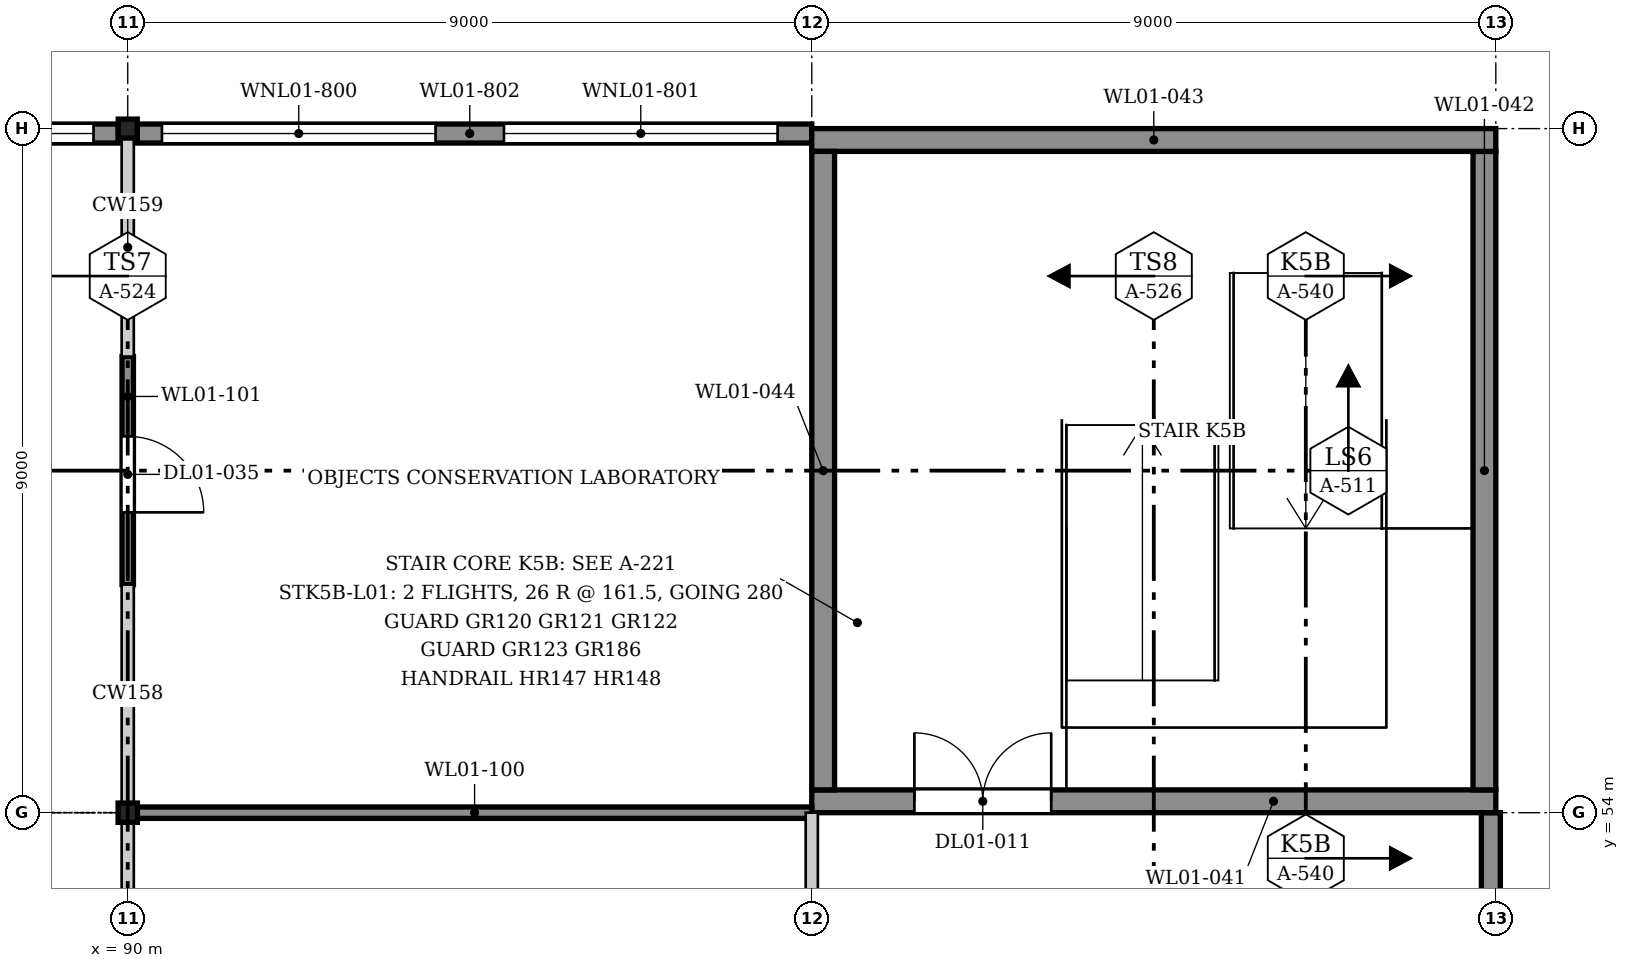
"""IFC4 building model, lengths in metres.
Left out: names, types, materials, properties, quantities, classifications, styles, units other than length and angle.
Written with IfcOpenShell. Run it as: python <this file> out.ifc"""

import sys

from ifc_helpers import new_model, si_unit, direction, frame, frame_2d, origin, origin_2d, place, context, subcontext, project, spatial, rectangle, hollow_rectangle, i_section, extrude, element, fill, save


model = new_model("IFC4")
c1 = context("Model", 3, precision=1e-05, world=origin(), true_north=direction((0.0, 1.0)))
c2 = subcontext(c1, "Body", "Model", "MODEL_VIEW")
j1 = project(units=[si_unit("LENGTHUNIT", "METRE"), si_unit("PLANEANGLEUNIT", "RADIAN")], contexts=[c1])
p1 = place(None, origin())
s1 = spatial("IfcSite", under=j1, at=p1, CompositionType="ELEMENT")
p2 = place(p1, origin())
s2 = spatial("IfcBuilding", under=s1, at=p2, CompositionType="ELEMENT")
p3 = place(p2, frame((0.0, 0.0, 5.0)))
s3 = spatial("IfcBuildingStorey", under=s2, at=p3, CompositionType="ELEMENT", Elevation=5.0)
p4 = place(p3, frame((90.0, 54.0, 0.0), z_axis=(0.0, 0.0, 1.0), x_axis=(1.0, 0.0, 0.0)))
e1 = element("IfcColumn", 1, at=p4, inside=s3, PredefinedType="COLUMN", context=c2, shape_type="SweptSolid", body=[
    extrude(i_section(OverallWidth=0.254, OverallDepth=0.254, WebThickness=0.009, FlangeThickness=0.014, FilletRadius=0.014, at=origin_2d()), origin(), (0.0, 0.0, 1.0), 3.9),
])
p5 = place(p3, frame((90.0, 63.0, 0.0), z_axis=(0.0, 0.0, 1.0), x_axis=(1.0, 0.0, 0.0)))
e2 = element("IfcColumn", 2, at=p5, inside=s3, PredefinedType="COLUMN", context=c2, shape_type="SweptSolid", body=[
    extrude(hollow_rectangle(XDim=0.25, YDim=0.25, WallThickness=0.01, InnerFilletRadius=0.015, OuterFilletRadius=0.025, at=origin_2d()), origin(), (0.0, 0.0, 1.0), 3.9),
])
p6 = place(p3, frame((107.935, 45.15, 0.0), z_axis=(0.0, 0.0, 1.0), x_axis=(0.0, 1.0, 0.0)))
e3 = element("IfcWall", 3, at=p6, inside=s3, PredefinedType="SOLIDWALL", context=c2, shape_type="SweptSolid", body=[
    extrude(rectangle(XDim=8.85, YDim=0.25, at=frame_2d((4.425, 0.0))), origin(), (0.0, 0.0, 1.0), 3.25),
])
p7 = place(p3, frame((90.125, 62.935, 0.0), z_axis=(0.0, 0.0, 1.0), x_axis=(1.0, 0.0, 0.0)))
e4 = element("IfcWall", 4, at=p7, inside=s3, PredefinedType="SOLIDWALL", context=c2, shape_type="SweptSolid", body=[
    extrude(rectangle(XDim=8.875, YDim=0.25, at=frame_2d((4.438, 0.0))), origin(), (0.0, 0.0, 1.0), 2.95),
])
p8 = place(p7, frame((0.325, 0.0, 1.1)))
e5 = element("IfcOpeningElement", 5, at=p8, cuts=e4, PredefinedType="OPENING", context=c2, shape_type="SweptSolid", body=[
    extrude(rectangle(XDim=3.6, YDim=1.2, at=frame_2d((1.8, 0.6))), frame((0.0, 0.135, 0.0), z_axis=(0.0, -1.0, 0.0), x_axis=(1.0, 0.0, 0.0)), (0.0, 0.0, 1.0), 0.27),
])
p9 = place(p7, frame((4.825, 0.0, 1.1)))
e6 = element("IfcOpeningElement", 6, at=p9, cuts=e4, PredefinedType="OPENING", context=c2, shape_type="SweptSolid", body=[
    extrude(rectangle(XDim=3.6, YDim=1.2, at=frame_2d((1.8, 0.6))), frame((0.0, 0.135, 0.0), z_axis=(0.0, -1.0, 0.0), x_axis=(1.0, 0.0, 0.0)), (0.0, 0.0, 1.0), 0.27),
])
p10 = place(p3, frame((81.0, 62.935, 0.0), z_axis=(0.0, 0.0, 1.0), x_axis=(1.0, 0.0, 0.0)))
e7 = element("IfcWall", 7, at=p10, inside=s3, PredefinedType="SOLIDWALL", context=c2, shape_type="SweptSolid", body=[
    extrude(rectangle(XDim=8.875, YDim=0.25, at=frame_2d((4.438, 0.0))), origin(), (0.0, 0.0, 1.0), 2.95),
])
p11 = place(p10, frame((0.45, 0.0, 1.1)))
e8 = element("IfcOpeningElement", 8, at=p11, cuts=e7, PredefinedType="OPENING", context=c2, shape_type="SweptSolid", body=[
    extrude(rectangle(XDim=3.6, YDim=1.2, at=frame_2d((1.8, 0.6))), frame((0.0, 0.135, 0.0), z_axis=(0.0, -1.0, 0.0), x_axis=(1.0, 0.0, 0.0)), (0.0, 0.0, 1.0), 0.27),
])
p12 = place(p10, frame((4.95, 0.0, 1.1)))
e9 = element("IfcOpeningElement", 9, at=p12, cuts=e7, PredefinedType="OPENING", context=c2, shape_type="SweptSolid", body=[
    extrude(rectangle(XDim=3.6, YDim=1.2, at=frame_2d((1.8, 0.6))), frame((0.0, 0.135, 0.0), z_axis=(0.0, -1.0, 0.0), x_axis=(1.0, 0.0, 0.0)), (0.0, 0.0, 1.0), 0.27),
])
p13 = place(p3, frame((99.0, 54.15, 0.0), z_axis=(0.0, 0.0, 1.0), x_axis=(1.0, 0.0, 0.0)))
e10 = element("IfcWall", 10, at=p13, inside=s3, PredefinedType="SOLIDWALL", context=c2, shape_type="SweptSolid", body=[
    extrude(rectangle(XDim=9.0, YDim=0.3, at=frame_2d((4.5, 0.0))), origin(), (0.0, 0.0, 1.0), 4.2),
])
p14 = place(p13, frame((1.35, 0.0, 0.0)))
e11 = element("IfcOpeningElement", 11, at=p14, cuts=e10, PredefinedType="OPENING", context=c2, shape_type="SweptSolid", body=[
    extrude(rectangle(XDim=1.8, YDim=2.1, at=frame_2d((0.9, 1.05))), frame((0.0, 0.16, 0.0), z_axis=(0.0, -1.0, 0.0), x_axis=(1.0, 0.0, 0.0)), (0.0, 0.0, 1.0), 0.32),
])
p15 = place(p3, frame((107.85, 54.3, 0.0), z_axis=(0.0, 0.0, 1.0), x_axis=(0.0, 1.0, 0.0)))
e12 = element("IfcWall", 12, at=p15, inside=s3, PredefinedType="SOLIDWALL", context=c2, shape_type="SweptSolid", body=[
    extrude(rectangle(XDim=8.4, YDim=0.3, at=frame_2d((4.2, 0.0))), origin(), (0.0, 0.0, 1.0), 4.2),
])
p16 = place(p3, frame((99.0, 62.85, 0.0), z_axis=(0.0, 0.0, 1.0), x_axis=(1.0, 0.0, 0.0)))
e13 = element("IfcWall", 13, at=p16, inside=s3, PredefinedType="SOLIDWALL", context=c2, shape_type="SweptSolid", body=[
    extrude(rectangle(XDim=9.0, YDim=0.3, at=frame_2d((4.5, 0.0))), origin(), (0.0, 0.0, 1.0), 4.2),
])
p17 = place(p3, frame((99.15, 54.3, 0.0), z_axis=(0.0, 0.0, 1.0), x_axis=(0.0, 1.0, 0.0)))
e14 = element("IfcWall", 14, at=p17, inside=s3, PredefinedType="SOLIDWALL", context=c2, shape_type="SweptSolid", body=[
    extrude(rectangle(XDim=8.4, YDim=0.3, at=frame_2d((4.2, 0.0))), origin(), (0.0, 0.0, 1.0), 4.2),
])
p18 = place(p3, frame((90.127, 54.0, 0.0), z_axis=(0.0, 0.0, 1.0), x_axis=(1.0, 0.0, 0.0)))
e15 = element("IfcWall", 15, at=p18, inside=s3, PredefinedType="PARTITIONING", context=c2, shape_type="SweptSolid", body=[
    extrude(rectangle(XDim=8.873, YDim=0.15, at=frame_2d((4.437, 0.0))), origin(), (0.0, 0.0, 1.0), 2.858),
])
p19 = place(p3, frame((90.0, 57.001, 0.0), z_axis=(0.0, 0.0, 1.0), x_axis=(0.0, 1.0, 0.0)))
e16 = element("IfcWall", 16, at=p19, inside=s3, PredefinedType="PARTITIONING", context=c2, shape_type="SweptSolid", body=[
    extrude(rectangle(XDim=3.0, YDim=0.15, at=frame_2d((1.5, 0.0))), origin(), (0.0, 0.0, 1.0), 2.858),
])
p20 = place(p19, frame((0.95, 0.0, 0.0)))
e17 = element("IfcOpeningElement", 17, at=p20, cuts=e16, PredefinedType="OPENING", context=c2, shape_type="SweptSolid", body=[
    extrude(rectangle(XDim=1.0, YDim=2.1, at=frame_2d((0.5, 1.05))), frame((0.0, 0.085, 0.0), z_axis=(0.0, -1.0, 0.0), x_axis=(1.0, 0.0, 0.0)), (0.0, 0.0, 1.0), 0.17),
])
p21 = place(p8, origin())
e18 = element("IfcWindow", 18, at=p21, inside=s3, PartitioningType="SINGLE_PANEL", PredefinedType="WINDOW", context=c2, shape_type="SweptSolid", body=[
    extrude(rectangle(XDim=3.6, YDim=1.2, at=frame_2d((1.8, 0.6))), frame((0.0, 0.03, 0.0), z_axis=(0.0, -1.0, 0.0), x_axis=(1.0, 0.0, 0.0)), (0.0, 0.0, 1.0), 0.06),
])
fill(e5, e18)
p22 = place(p9, origin())
e19 = element("IfcWindow", 19, at=p22, inside=s3, PartitioningType="SINGLE_PANEL", PredefinedType="WINDOW", context=c2, shape_type="SweptSolid", body=[
    extrude(rectangle(XDim=3.6, YDim=1.2, at=frame_2d((1.8, 0.6))), frame((0.0, 0.03, 0.0), z_axis=(0.0, -1.0, 0.0), x_axis=(1.0, 0.0, 0.0)), (0.0, 0.0, 1.0), 0.06),
])
fill(e6, e19)
p23 = place(p12, origin())
e20 = element("IfcWindow", 20, at=p23, inside=s3, PartitioningType="SINGLE_PANEL", PredefinedType="WINDOW", context=c2, shape_type="SweptSolid", body=[
    extrude(rectangle(XDim=3.6, YDim=1.2, at=frame_2d((1.8, 0.6))), frame((0.0, 0.03, 0.0), z_axis=(0.0, -1.0, 0.0), x_axis=(1.0, 0.0, 0.0)), (0.0, 0.0, 1.0), 0.06),
])
fill(e9, e20)
p24 = place(p14, origin())
e21 = element("IfcDoor", 21, at=p24, inside=s3, OperationType="DOUBLE_DOOR_SINGLE_SWING", PredefinedType="DOOR", context=c2, shape_type="SweptSolid", body=[
    extrude(rectangle(XDim=1.8, YDim=2.1, at=frame_2d((0.9, 1.05))), frame((0.0, 0.025, 0.0), z_axis=(0.0, -1.0, 0.0), x_axis=(1.0, 0.0, 0.0)), (0.0, 0.0, 1.0), 0.05),
])
fill(e11, e21)
p25 = place(p20, frame((1.0, 0.0, 0.0), z_axis=(0.0, 0.0, 1.0), x_axis=(-1.0, 0.0, 0.0)))
e22 = element("IfcDoor", 22, at=p25, inside=s3, OperationType="SINGLE_SWING_LEFT", PredefinedType="DOOR", context=c2, shape_type="SweptSolid", body=[
    extrude(rectangle(XDim=1.0, YDim=2.1, at=frame_2d((0.5, 1.05))), frame((0.0, 0.025, 0.0), z_axis=(0.0, -1.0, 0.0), x_axis=(1.0, 0.0, 0.0)), (0.0, 0.0, 1.0), 0.05),
])
fill(e17, e22)
save(model, sys.argv[1])
